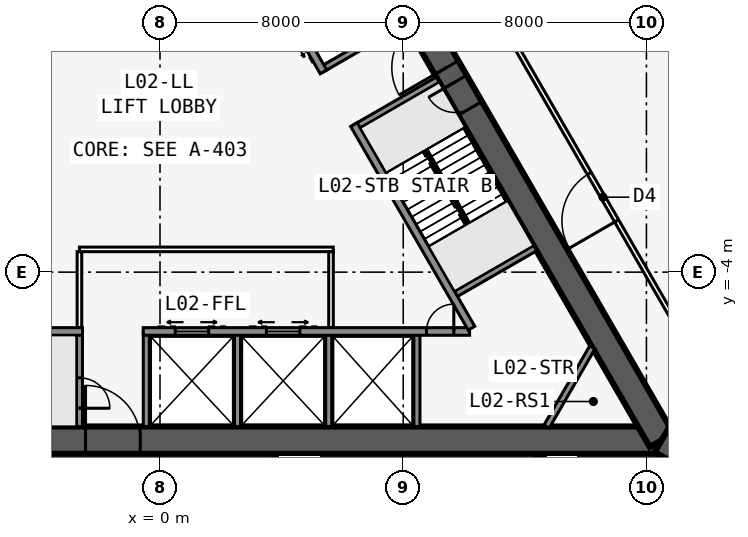
"""IFC4 building model, lengths in metres.
Left out: names, types, materials, properties, quantities, classifications, styles, units other than length and angle.
Written with IfcOpenShell. Run it as: python <this file> out.ifc"""

import sys

from ifc_helpers import new_model, si_unit, direction, frame, frame_2d, origin, place, context, subcontext, project, spatial, rectangle, extrude, element, fill, save


model = new_model("IFC4")
c1 = context("Model", 3, precision=1e-05, world=origin(), true_north=direction((0.0, 1.0)))
c2 = subcontext(c1, "Body", "Model", "MODEL_VIEW")
j1 = project(units=[si_unit("LENGTHUNIT", "METRE"), si_unit("PLANEANGLEUNIT", "RADIAN")], contexts=[c1])
p1 = place(None, origin())
s1 = spatial("IfcSite", under=j1, at=p1, CompositionType="ELEMENT")
p2 = place(p1, origin())
s2 = spatial("IfcBuilding", under=s1, at=p2, CompositionType="ELEMENT")
p3 = place(p2, frame((0.0, 0.0, 11.0)))
s3 = spatial("IfcBuildingStorey", under=s2, at=p3, CompositionType="ELEMENT", Elevation=11.0)
p4 = place(p3, frame((-16.5, -9.526, 0.0), z_axis=(0.0, 0.0, 1.0), x_axis=(1.0, 0.0, 0.0)))
e1 = element("IfcWall", 1, at=p4, inside=s3, PredefinedType="SHEAR", context=c2, shape_type="SweptSolid", body=[
    extrude(rectangle(XDim=33.0, YDim=0.9, at=frame_2d((16.5, 0.0))), origin(), (0.0, 0.0, 1.0), 6.5),
])
p5 = place(p4, frame((14.05, 0.0, 0.0)))
e2 = element("IfcOpeningElement", 2, at=p5, cuts=e1, PredefinedType="OPENING", context=c2, shape_type="SweptSolid", body=[
    extrude(rectangle(XDim=1.8, YDim=2.13, at=frame_2d((0.9, 1.065))), frame((0.0, 0.46, 0.0), z_axis=(0.0, -1.0, 0.0), x_axis=(1.0, 0.0, 0.0)), (0.0, 0.0, 1.0), 0.92),
])
p6 = place(p3, frame((-10.183, -5.951, 0.0), z_axis=(0.0, 0.0, 1.0), x_axis=(1.0, 0.0, 0.0)))
e3 = element("IfcWall", 3, at=p6, inside=s3, PredefinedType="SOLIDWALL", context=c2, shape_type="SweptSolid", body=[
    extrude(rectangle(XDim=7.633, YDim=0.25, at=frame_2d((3.816, 0.0))), origin(), (0.0, 0.0, 1.0), 6.25),
])
p7 = place(p3, frame((-0.55, -5.951, 0.0), z_axis=(0.0, 0.0, 1.0), x_axis=(1.0, 0.0, 0.0)))
e4 = element("IfcWall", 4, at=p7, inside=s3, PredefinedType="SOLIDWALL", context=c2, shape_type="SweptSolid", body=[
    extrude(rectangle(XDim=10.733, YDim=0.25, at=frame_2d((5.366, 0.0))), origin(), (0.0, 0.0, 1.0), 6.25),
])
p8 = place(p7, frame((9.314, 0.0, 0.0)))
e5 = element("IfcOpeningElement", 5, at=p8, cuts=e4, PredefinedType="OPENING", context=c2, shape_type="SweptSolid", body=[
    extrude(rectangle(XDim=0.9, YDim=2.13, at=frame_2d((0.45, 1.065))), frame((0.0, 0.135, 0.0), z_axis=(0.0, -1.0, 0.0), x_axis=(1.0, 0.0, 0.0)), (0.0, 0.0, 1.0), 0.27),
])
p9 = place(p7, frame((1.05, 0.0, 0.0)))
e6 = element("IfcOpeningElement", 6, at=p9, cuts=e4, PredefinedType="OPENING", context=c2, shape_type="SweptSolid", body=[
    extrude(rectangle(XDim=1.1, YDim=2.13, at=frame_2d((0.55, 1.065))), frame((0.0, 0.135, 0.0), z_axis=(0.0, -1.0, 0.0), x_axis=(1.0, 0.0, 0.0)), (0.0, 0.0, 1.0), 0.27),
])
p10 = place(p7, frame((4.05, 0.0, 0.0)))
e7 = element("IfcOpeningElement", 7, at=p10, cuts=e4, PredefinedType="OPENING", context=c2, shape_type="SweptSolid", body=[
    extrude(rectangle(XDim=1.1, YDim=2.13, at=frame_2d((0.55, 1.065))), frame((0.0, 0.135, 0.0), z_axis=(0.0, -1.0, 0.0), x_axis=(1.0, 0.0, 0.0)), (0.0, 0.0, 1.0), 0.27),
])
p11 = place(p3, frame((-2.65, -5.951, 0.0), z_axis=(0.0, 0.0, 1.0), x_axis=(0.0, -1.0, 0.0)))
e8 = element("IfcWall", 8, at=p11, inside=s3, PredefinedType="SOLIDWALL", context=c2, shape_type="SweptSolid", body=[
    extrude(rectangle(XDim=3.125, YDim=0.2, at=frame_2d((1.562, 0.0))), origin(), (0.0, 0.0, 1.0), 6.25),
])
p12 = place(p11, frame((1.525, 0.0, 0.0)))
e9 = element("IfcOpeningElement", 9, at=p12, cuts=e8, PredefinedType="OPENING", context=c2, shape_type="SweptSolid", body=[
    extrude(rectangle(XDim=1.0, YDim=2.13, at=frame_2d((0.5, 1.065))), frame((0.0, 0.11, 0.0), z_axis=(0.0, -1.0, 0.0), x_axis=(1.0, 0.0, 0.0)), (0.0, 0.0, 1.0), 0.22),
])
for number, where, z_axis, x_axis in (
    (10, (-0.45, -5.951, 0.0), (0.0, 0.0, 1.0), (0.0, -1.0, 0.0)),
    (11, (2.55, -5.951, 0.0), (0.0, 0.0, 1.0), (0.0, -1.0, 0.0)),
    (12, (5.55, -5.951, 0.0), (0.0, 0.0, 1.0), (0.0, -1.0, 0.0)),
    (13, (8.45, -5.951, 0.0), (0.0, 0.0, 1.0), (0.0, -1.0, 0.0)),
):
    element("IfcWall", number, at=place(p3, frame(where, z_axis=z_axis, x_axis=x_axis)), inside=s3, PredefinedType="SOLIDWALL", context=c2, shape_type="SweptSolid", body=[
        extrude(rectangle(XDim=3.125, YDim=0.2, at=frame_2d((1.562, 0.0))), origin(), (0.0, 0.0, 1.0), 6.25),
    ])
p13 = place(p3, frame((16.5, -9.526, 0.0), z_axis=(0.0, 0.0, 1.0), x_axis=(-0.499999749417, 0.866025548458, 0.0)))
e14 = element("IfcWall", 14, at=p13, inside=s3, PredefinedType="SHEAR", context=c2, shape_type="SweptSolid", body=[
    extrude(rectangle(XDim=33.0, YDim=0.9, at=frame_2d((16.5, 0.0))), origin(), (0.0, 0.0, 1.0), 6.5),
])
p14 = place(p13, frame((14.15, 0.0, 0.0)))
e15 = element("IfcOpeningElement", 15, at=p14, cuts=e14, PredefinedType="OPENING", context=c2, shape_type="SweptSolid", body=[
    extrude(rectangle(XDim=1.8, YDim=2.13, at=frame_2d((0.9, 1.065))), frame((0.0, 0.46, 0.0), z_axis=(0.0, -1.0, 0.0), x_axis=(1.0, 0.0, 0.0)), (0.0, 0.0, 1.0), 0.92),
])
p15 = place(p13, frame((12.6, 0.0, 0.0)))
e16 = element("IfcOpeningElement", 16, at=p15, cuts=e14, PredefinedType="OPENING", context=c2, shape_type="SweptSolid", body=[
    extrude(rectangle(XDim=1.0, YDim=2.13, at=frame_2d((0.5, 1.065))), frame((0.0, 0.46, 0.0), z_axis=(0.0, -1.0, 0.0), x_axis=(1.0, 0.0, 0.0)), (0.0, 0.0, 1.0), 0.92),
])
p16 = place(p3, frame((10.245, -5.843, 0.0), z_axis=(0.0, 0.0, 1.0), x_axis=(-0.499993009313, 0.866029439822, 0.0)))
e17 = element("IfcWall", 17, at=p16, inside=s3, PredefinedType="SOLIDWALL", context=c2, shape_type="SweptSolid", body=[
    extrude(rectangle(XDim=7.733, YDim=0.25, at=frame_2d((3.866, 0.0))), origin(), (0.0, 0.0, 1.0), 6.25),
])
p17 = place(p3, frame((5.379, 2.586, 0.0), z_axis=(0.0, 0.0, 1.0), x_axis=(-0.500001375892, 0.866024609411, 0.0)))
e18 = element("IfcWall", 18, at=p17, inside=s3, PredefinedType="SOLIDWALL", context=c2, shape_type="SweptSolid", body=[
    extrude(rectangle(XDim=10.633, YDim=0.25, at=frame_2d((5.316, 0.0))), origin(), (0.0, 0.0, 1.0), 6.25),
])
p18 = place(p17, frame((9.164, 0.0, 0.0)))
e19 = element("IfcOpeningElement", 19, at=p18, cuts=e18, PredefinedType="OPENING", context=c2, shape_type="SweptSolid", body=[
    extrude(rectangle(XDim=0.9, YDim=2.13, at=frame_2d((0.45, 1.065))), frame((0.0, 0.135, 0.0), z_axis=(0.0, -1.0, 0.0), x_axis=(1.0, 0.0, 0.0)), (0.0, 0.0, 1.0), 0.27),
])
p19 = place(p17, frame((1.0, 0.0, 0.0)))
e20 = element("IfcOpeningElement", 20, at=p19, cuts=e18, PredefinedType="OPENING", context=c2, shape_type="SweptSolid", body=[
    extrude(rectangle(XDim=1.1, YDim=2.13, at=frame_2d((0.55, 1.065))), frame((0.0, 0.135, 0.0), z_axis=(0.0, -1.0, 0.0), x_axis=(1.0, 0.0, 0.0)), (0.0, 0.0, 1.0), 0.27),
])
p20 = place(p17, frame((3.9, 0.0, 0.0)))
e21 = element("IfcOpeningElement", 21, at=p20, cuts=e18, PredefinedType="OPENING", context=c2, shape_type="SweptSolid", body=[
    extrude(rectangle(XDim=1.1, YDim=2.13, at=frame_2d((0.55, 1.065))), frame((0.0, 0.135, 0.0), z_axis=(0.0, -1.0, 0.0), x_axis=(1.0, 0.0, 0.0)), (0.0, 0.0, 1.0), 0.27),
])
p21 = place(p17, frame((6.8, 0.0, 0.0)))
e22 = element("IfcOpeningElement", 22, at=p21, cuts=e18, PredefinedType="OPENING", context=c2, shape_type="SweptSolid", body=[
    extrude(rectangle(XDim=1.1, YDim=2.13, at=frame_2d((0.55, 1.065))), frame((0.0, 0.135, 0.0), z_axis=(0.0, -1.0, 0.0), x_axis=(1.0, 0.0, 0.0)), (0.0, 0.0, 1.0), 0.27),
])
for number, where, z_axis, x_axis in (
    (23, (9.629, -4.775, 0.0), (0.0, 0.0, 1.0), (0.866, 0.5, 0.0)),
    (24, (6.429, 0.767, 0.0), (0.0, 0.0, 1.0), (0.866, 0.5, 0.0)),
    (25, (5.329, 2.673, 0.0), (0.0, 0.0, 1.0), (0.866, 0.5, 0.0)),
):
    element("IfcWall", number, at=place(p3, frame(where, z_axis=z_axis, x_axis=x_axis)), inside=s3, PredefinedType="SOLIDWALL", context=c2, shape_type="SweptSolid", body=[
        extrude(rectangle(XDim=3.125, YDim=0.2, at=frame_2d((1.562, 0.0))), origin(), (0.0, 0.0, 1.0), 6.25),
    ])
p22 = place(p3, frame((0.0, 19.052, 0.0), z_axis=(0.0, 0.0, 1.0), x_axis=(-0.499999749417, -0.866025548458, 0.0)))
e26 = element("IfcWall", 26, at=p22, inside=s3, PredefinedType="SHEAR", context=c2, shape_type="SweptSolid", body=[
    extrude(rectangle(XDim=33.0, YDim=0.9, at=frame_2d((16.5, 0.0))), origin(), (0.0, 0.0, 1.0), 6.5),
])
p23 = place(p22, frame((14.15, 0.0, 0.0)))
e27 = element("IfcOpeningElement", 27, at=p23, cuts=e26, PredefinedType="OPENING", context=c2, shape_type="SweptSolid", body=[
    extrude(rectangle(XDim=1.8, YDim=2.13, at=frame_2d((0.9, 1.065))), frame((0.0, 0.46, 0.0), z_axis=(0.0, -1.0, 0.0), x_axis=(1.0, 0.0, 0.0)), (0.0, 0.0, 1.0), 0.92),
])
p24 = place(p22, frame((12.6, 0.0, 0.0)))
e28 = element("IfcOpeningElement", 28, at=p24, cuts=e26, PredefinedType="OPENING", context=c2, shape_type="SweptSolid", body=[
    extrude(rectangle(XDim=1.0, YDim=2.13, at=frame_2d((0.5, 1.065))), frame((0.0, 0.46, 0.0), z_axis=(0.0, -1.0, 0.0), x_axis=(1.0, 0.0, 0.0)), (0.0, 0.0, 1.0), 0.92),
])
p25 = place(p3, frame((16.5, -9.526, 0.0), z_axis=(0.0, 0.0, 1.0), x_axis=(0.866031398331, -0.499989616998, 0.0)))
e29 = element("IfcWall", 29, at=p25, inside=s3, PredefinedType="SHEAR", context=c2, shape_type="SweptSolid", body=[
    extrude(rectangle(XDim=4.746, YDim=0.9, at=frame_2d((2.373, 0.0))), origin(), (0.0, 0.0, 1.0), 6.5),
])
p26 = place(p25, frame((1.8, 0.0, 0.0)))
e30 = element("IfcOpeningElement", 30, at=p26, cuts=e29, PredefinedType="OPENING", context=c2, shape_type="SweptSolid", body=[
    extrude(rectangle(XDim=1.8, YDim=2.13, at=frame_2d((0.9, 1.065))), frame((0.0, 0.46, 0.0), z_axis=(0.0, -1.0, 0.0), x_axis=(1.0, 0.0, 0.0)), (0.0, 0.0, 1.0), 0.92),
])
p27 = place(p3, frame((20.027, -10.985, 0.0), z_axis=(0.0, 0.0, 1.0), x_axis=(-0.500001677587, 0.866024435227, 0.0)))
e31 = element("IfcWall", 31, at=p27, inside=s3, PredefinedType="PARTITIONING", context=c2, shape_type="SweptSolid", body=[
    extrude(rectangle(XDim=39.054, YDim=0.15, at=frame_2d((19.527, 0.0))), origin(), (0.0, 0.0, 1.0), 5.308),
])
p28 = place(p27, frame((10.013, 0.0, 0.0)))
e32 = element("IfcOpeningElement", 32, at=p28, cuts=e31, PredefinedType="OPENING", context=c2, shape_type="SweptSolid", body=[
    extrude(rectangle(XDim=1.8, YDim=2.13, at=frame_2d((0.9, 1.065))), frame((0.0, 0.085, 0.0), z_axis=(0.0, -1.0, 0.0), x_axis=(1.0, 0.0, 0.0)), (0.0, 0.0, 1.0), 0.17),
])
p29 = place(p27, frame((23.227, 0.0, 0.0)))
e33 = element("IfcOpeningElement", 33, at=p29, cuts=e31, PredefinedType="OPENING", context=c2, shape_type="SweptSolid", body=[
    extrude(rectangle(XDim=1.8, YDim=2.13, at=frame_2d((0.9, 1.065))), frame((0.0, 0.085, 0.0), z_axis=(0.0, -1.0, 0.0), x_axis=(1.0, 0.0, 0.0)), (0.0, 0.0, 1.0), 0.17),
])
p30 = place(p27, frame((27.627, 0.0, 0.0)))
e34 = element("IfcOpeningElement", 34, at=p30, cuts=e31, PredefinedType="OPENING", context=c2, shape_type="SweptSolid", body=[
    extrude(rectangle(XDim=1.0, YDim=2.13, at=frame_2d((0.5, 1.065))), frame((0.0, 0.085, 0.0), z_axis=(0.0, -1.0, 0.0), x_axis=(1.0, 0.0, 0.0)), (0.0, 0.0, 1.0), 0.17),
])
p31 = place(p27, frame((30.527, 0.0, 0.0)))
e35 = element("IfcOpeningElement", 35, at=p31, cuts=e31, PredefinedType="OPENING", context=c2, shape_type="SweptSolid", body=[
    extrude(rectangle(XDim=1.0, YDim=2.13, at=frame_2d((0.5, 1.065))), frame((0.0, 0.085, 0.0), z_axis=(0.0, -1.0, 0.0), x_axis=(1.0, 0.0, 0.0)), (0.0, 0.0, 1.0), 0.17),
])
p32 = place(p27, frame((33.277, 0.0, 0.0)))
e36 = element("IfcOpeningElement", 36, at=p32, cuts=e31, PredefinedType="OPENING", context=c2, shape_type="SweptSolid", body=[
    extrude(rectangle(XDim=1.0, YDim=2.13, at=frame_2d((0.5, 1.065))), frame((0.0, 0.085, 0.0), z_axis=(0.0, -1.0, 0.0), x_axis=(1.0, 0.0, 0.0)), (0.0, 0.0, 1.0), 0.17),
])
p33 = place(p27, frame((35.99, 0.0, 0.0)))
e37 = element("IfcOpeningElement", 37, at=p33, cuts=e31, PredefinedType="OPENING", context=c2, shape_type="SweptSolid", body=[
    extrude(rectangle(XDim=1.8, YDim=2.13, at=frame_2d((0.9, 1.065))), frame((0.0, 0.085, 0.0), z_axis=(0.0, -1.0, 0.0), x_axis=(1.0, 0.0, 0.0)), (0.0, 0.0, 1.0), 0.17),
])
p34 = place(p3, frame((-0.5, 22.836, 0.0), z_axis=(0.0, 0.0, 1.0), x_axis=(-0.500001677587, -0.866024435227, 0.0)))
e38 = element("IfcWall", 38, at=p34, inside=s3, PredefinedType="PARTITIONING", context=c2, shape_type="SweptSolid", body=[
    extrude(rectangle(XDim=39.054, YDim=0.15, at=frame_2d((19.527, 0.0))), origin(), (0.0, 0.0, 1.0), 5.308),
])
p35 = place(p34, frame((10.013, 0.0, 0.0)))
e39 = element("IfcOpeningElement", 39, at=p35, cuts=e38, PredefinedType="OPENING", context=c2, shape_type="SweptSolid", body=[
    extrude(rectangle(XDim=1.8, YDim=2.13, at=frame_2d((0.9, 1.065))), frame((0.0, 0.085, 0.0), z_axis=(0.0, -1.0, 0.0), x_axis=(1.0, 0.0, 0.0)), (0.0, 0.0, 1.0), 0.17),
])
p36 = place(p34, frame((23.227, 0.0, 0.0)))
e40 = element("IfcOpeningElement", 40, at=p36, cuts=e38, PredefinedType="OPENING", context=c2, shape_type="SweptSolid", body=[
    extrude(rectangle(XDim=1.8, YDim=2.13, at=frame_2d((0.9, 1.065))), frame((0.0, 0.085, 0.0), z_axis=(0.0, -1.0, 0.0), x_axis=(1.0, 0.0, 0.0)), (0.0, 0.0, 1.0), 0.17),
])
p37 = place(p34, frame((27.627, 0.0, 0.0)))
e41 = element("IfcOpeningElement", 41, at=p37, cuts=e38, PredefinedType="OPENING", context=c2, shape_type="SweptSolid", body=[
    extrude(rectangle(XDim=1.0, YDim=2.13, at=frame_2d((0.5, 1.065))), frame((0.0, 0.085, 0.0), z_axis=(0.0, -1.0, 0.0), x_axis=(1.0, 0.0, 0.0)), (0.0, 0.0, 1.0), 0.17),
])
p38 = place(p34, frame((30.277, 0.0, 0.0)))
e42 = element("IfcOpeningElement", 42, at=p38, cuts=e38, PredefinedType="OPENING", context=c2, shape_type="SweptSolid", body=[
    extrude(rectangle(XDim=1.0, YDim=2.13, at=frame_2d((0.5, 1.065))), frame((0.0, 0.085, 0.0), z_axis=(0.0, -1.0, 0.0), x_axis=(1.0, 0.0, 0.0)), (0.0, 0.0, 1.0), 0.17),
])
p39 = place(p34, frame((34.89, 0.0, 0.0)))
e43 = element("IfcOpeningElement", 43, at=p39, cuts=e38, PredefinedType="OPENING", context=c2, shape_type="SweptSolid", body=[
    extrude(rectangle(XDim=1.0, YDim=2.13, at=frame_2d((0.5, 1.065))), frame((0.0, 0.085, 0.0), z_axis=(0.0, -1.0, 0.0), x_axis=(1.0, 0.0, 0.0)), (0.0, 0.0, 1.0), 0.17),
])
p40 = place(p3, frame((-2.65, -3.251, 0.0), z_axis=(0.0, 0.0, 1.0), x_axis=(1.0, 0.0, 0.0)))
e44 = element("IfcWall", 44, at=p40, inside=s3, PredefinedType="PARTITIONING", context=c2, shape_type="SweptSolid", body=[
    extrude(rectangle(XDim=8.35, YDim=0.15, at=frame_2d((4.175, 0.0))), origin(), (0.0, 0.0, 1.0), 6.25),
])
for number, where, z_axis, x_axis in (
    (45, (-2.65, -5.826, 0.0), (0.0, 0.0, 1.0), (0.0, 1.0, 0.0)),
    (46, (5.625, -5.826, 0.0), (0.0, 0.0, 1.0), (0.0, 1.0, 0.0)),
):
    element("IfcWall", number, at=place(p3, frame(where, z_axis=z_axis, x_axis=x_axis)), inside=s3, PredefinedType="PARTITIONING", context=c2, shape_type="SweptSolid", body=[
        extrude(rectangle(XDim=2.5, YDim=0.15, at=frame_2d((1.25, 0.0))), origin(), (0.0, 0.0, 1.0), 6.25),
    ])
p41 = place(p3, frame((14.219, -6.476, 0.0), z_axis=(0.0, 0.0, 1.0), x_axis=(-0.499952404951, -0.866052881055, 0.0)))
e47 = element("IfcWall", 47, at=p41, inside=s3, PredefinedType="SOLIDWALL", context=c2, shape_type="SweptSolid", body=[
    extrude(rectangle(XDim=3.002, YDim=0.2, at=frame_2d((1.501, 0.0))), origin(), (0.0, 0.0, 1.0), 6.25),
])
p42 = place(p3, frame((10.135, -2.401, 0.0), z_axis=(0.0, 0.0, 1.0), x_axis=(-0.499992232847, 0.866029888106, 0.0)))
e48 = element("IfcWall", 48, at=p42, inside=s3, PredefinedType="SOLIDWALL", context=c2, shape_type="SweptSolid", body=[
    extrude(rectangle(XDim=2.794, YDim=0.1, at=frame_2d((1.397, 0.0))), origin(), (0.0, 0.0, 1.0), 6.5),
])
p43 = place(p28, origin())
e49 = element("IfcDoor", 49, at=p43, inside=s3, OperationType="DOUBLE_DOOR_SINGLE_SWING", PredefinedType="DOOR", context=c2, shape_type="SweptSolid", body=[
    extrude(rectangle(XDim=1.8, YDim=2.13, at=frame_2d((0.9, 1.065))), frame((0.0, 0.025, 0.0), z_axis=(0.0, -1.0, 0.0), x_axis=(1.0, 0.0, 0.0)), (0.0, 0.0, 1.0), 0.05),
])
fill(e32, e49)
p44 = place(p5, origin())
e50 = element("IfcDoor", 50, at=p44, inside=s3, OperationType="DOUBLE_DOOR_SINGLE_SWING", PredefinedType="DOOR", context=c2, shape_type="SweptSolid", body=[
    extrude(rectangle(XDim=1.8, YDim=2.13, at=frame_2d((0.9, 1.065))), frame((0.0, 0.025, 0.0), z_axis=(0.0, -1.0, 0.0), x_axis=(1.0, 0.0, 0.0)), (0.0, 0.0, 1.0), 0.05),
])
fill(e2, e50)
p45 = place(p12, origin())
e51 = element("IfcDoor", 51, at=p45, inside=s3, OperationType="SINGLE_SWING_RIGHT", PredefinedType="DOOR", context=c2, shape_type="SweptSolid", body=[
    extrude(rectangle(XDim=1.0, YDim=2.13, at=frame_2d((0.5, 1.065))), frame((0.0, 0.025, 0.0), z_axis=(0.0, -1.0, 0.0), x_axis=(1.0, 0.0, 0.0)), (0.0, 0.0, 1.0), 0.05),
])
fill(e9, e51)
p46 = place(p14, origin())
e52 = element("IfcDoor", 52, at=p46, inside=s3, OperationType="DOUBLE_DOOR_SINGLE_SWING", PredefinedType="DOOR", context=c2, shape_type="SweptSolid", body=[
    extrude(rectangle(XDim=1.8, YDim=2.13, at=frame_2d((0.9, 1.065))), frame((0.0, 0.025, 0.0), z_axis=(0.0, -1.0, 0.0), x_axis=(1.0, 0.0, 0.0)), (0.0, 0.0, 1.0), 0.05),
])
fill(e15, e52)
p47 = place(p15, origin())
e53 = element("IfcDoor", 53, at=p47, inside=s3, OperationType="SINGLE_SWING_RIGHT", PredefinedType="DOOR", context=c2, shape_type="SweptSolid", body=[
    extrude(rectangle(XDim=1.0, YDim=2.13, at=frame_2d((0.5, 1.065))), frame((0.0, 0.025, 0.0), z_axis=(0.0, -1.0, 0.0), x_axis=(1.0, 0.0, 0.0)), (0.0, 0.0, 1.0), 0.05),
])
fill(e16, e53)
p48 = place(p8, origin())
e54 = element("IfcDoor", 54, at=p48, inside=s3, OperationType="SINGLE_SWING_RIGHT", PredefinedType="DOOR", context=c2, shape_type="SweptSolid", body=[
    extrude(rectangle(XDim=0.9, YDim=2.13, at=frame_2d((0.45, 1.065))), frame((0.0, 0.025, 0.0), z_axis=(0.0, -1.0, 0.0), x_axis=(1.0, 0.0, 0.0)), (0.0, 0.0, 1.0), 0.05),
])
fill(e5, e54)
p49 = place(p9, origin())
e55 = element("IfcDoor", 55, at=p49, inside=s3, OperationType="DOUBLE_DOOR_SLIDING", PredefinedType="USERDEFINED", context=c2, shape_type="SweptSolid", body=[
    extrude(rectangle(XDim=1.1, YDim=2.13, at=frame_2d((0.55, 1.065))), frame((0.0, 0.025, 0.0), z_axis=(0.0, -1.0, 0.0), x_axis=(1.0, 0.0, 0.0)), (0.0, 0.0, 1.0), 0.05),
])
fill(e6, e55)
p50 = place(p10, origin())
e56 = element("IfcDoor", 56, at=p50, inside=s3, OperationType="DOUBLE_DOOR_SLIDING", PredefinedType="USERDEFINED", context=c2, shape_type="SweptSolid", body=[
    extrude(rectangle(XDim=1.1, YDim=2.13, at=frame_2d((0.55, 1.065))), frame((0.0, 0.025, 0.0), z_axis=(0.0, -1.0, 0.0), x_axis=(1.0, 0.0, 0.0)), (0.0, 0.0, 1.0), 0.05),
])
fill(e7, e56)
save(model, sys.argv[1])
